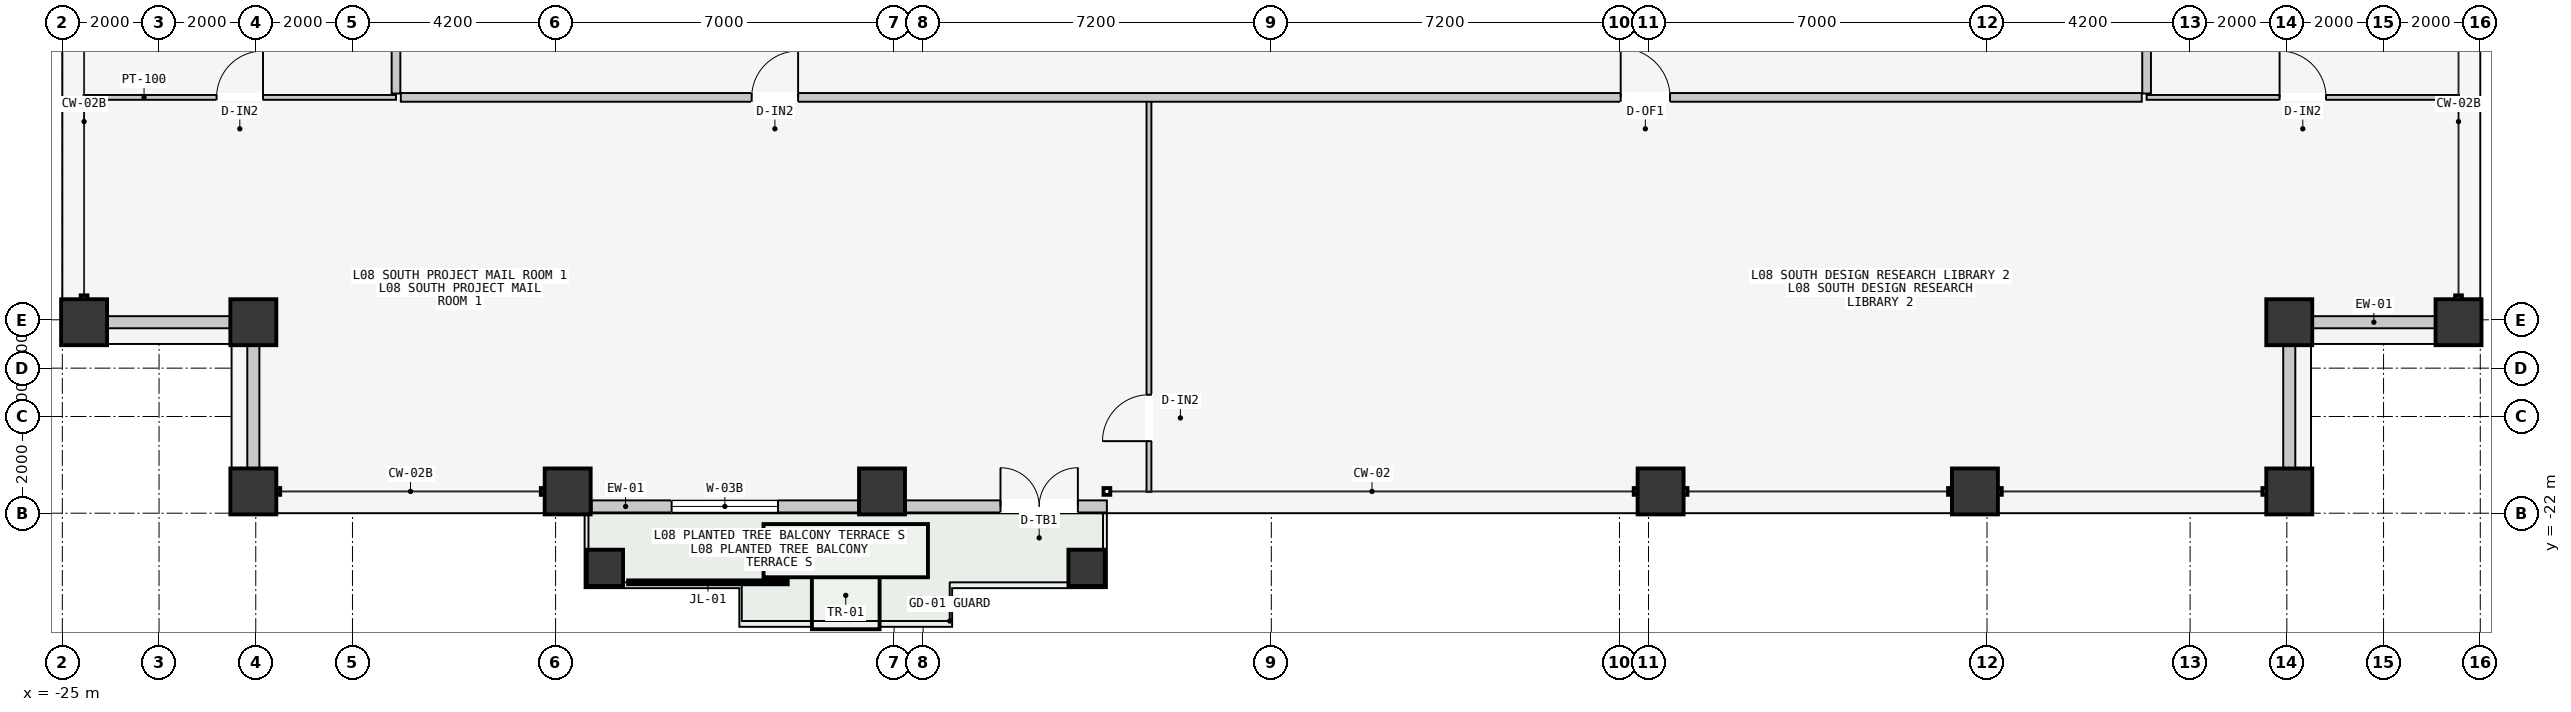
"""IFC4 building model, lengths in metres.
Left out: names, types, materials, properties, quantities, classifications, styles, units other than length and angle.
Written with IfcOpenShell. Run it as: python <this file> out.ifc"""

import sys

from ifc_helpers import new_model, si_unit, direction, frame, frame_2d, origin, origin_2d, place, context, subcontext, project, spatial, rectangle, hollow_rectangle, extrude, element, fill, save


model = new_model("IFC4")
c1 = context("Model", 3, precision=1e-05, world=origin(), true_north=direction((0.0, 1.0)))
c2 = subcontext(c1, "Body", "Model", "MODEL_VIEW")
j1 = project(units=[si_unit("LENGTHUNIT", "METRE"), si_unit("PLANEANGLEUNIT", "RADIAN")], contexts=[c1])
p1 = place(None, origin())
s1 = spatial("IfcSite", under=j1, at=p1, CompositionType="ELEMENT")
p2 = place(p1, origin())
s2 = spatial("IfcBuilding", under=s1, at=p2, CompositionType="ELEMENT")
p3 = place(p2, frame((0.0, 0.0, 34.8)))
s3 = spatial("IfcBuildingStorey", under=s2, at=p3, CompositionType="ELEMENT", Elevation=34.8)
for number, where, z_axis, x_axis in (
    (1, (-21.05, -21.55, 0.0), (0.0, 0.0, 1.0), (1.0, 0.0, 0.0)),
    (2, (-14.55, -21.55, 0.0), (0.0, 0.0, 1.0), (1.0, 0.0, 0.0)),
    (3, (-8.05, -21.55, 0.0), (0.0, 0.0, 1.0), (1.0, 0.0, 0.0)),
    (4, (8.05, -21.55, 0.0), (0.0, 0.0, 1.0), (1.0, 0.0, 0.0)),
    (5, (14.55, -21.55, 0.0), (0.0, 0.0, 1.0), (1.0, 0.0, 0.0)),
    (6, (21.05, -21.55, 0.0), (0.0, 0.0, 1.0), (1.0, 0.0, 0.0)),
    (7, (-24.55, -18.05, 0.0), (0.0, 0.0, 1.0), (0.0, 1.0, 0.0)),
    (8, (24.55, -18.05, 0.0), (0.0, 0.0, 1.0), (0.0, 1.0, 0.0)),
    (9, (21.05, -18.05, 0.0), (0.0, 0.0, 1.0), (1.0, 0.0, 0.0)),
    (10, (-21.05, -18.05, 0.0), (0.0, 0.0, 1.0), (1.0, 0.0, 0.0)),
):
    element("IfcColumn", number, at=place(p3, frame(where, z_axis=z_axis, x_axis=x_axis)), inside=s3, PredefinedType="COLUMN", context=c2, shape_type="SweptSolid", body=[
        extrude(hollow_rectangle(XDim=0.95, YDim=0.95, WallThickness=0.048, at=origin_2d()), origin(), (0.0, 0.0, 1.0), 3.6),
    ])
for number, where, z_axis, x_axis in (
    (11, (-13.78, -23.13, 0.0), (0.0, 0.0, 1.0), (1.0, 0.0, 0.0)),
    (12, (-3.82, -23.13, 0.0), (0.0, 0.0, 1.0), (1.0, 0.0, 0.0)),
):
    element("IfcColumn", number, at=place(p3, frame(where, z_axis=z_axis, x_axis=x_axis)), inside=s3, PredefinedType="COLUMN", context=c2, shape_type="SweptSolid", body=[
        extrude(hollow_rectangle(XDim=0.75, YDim=0.75, WallThickness=0.032, at=origin_2d()), origin(), (0.0, 0.0, 1.0), 3.6),
    ])
p4 = place(p3, frame((-14.055, -21.86, 0.0), z_axis=(0.0, 0.0, 1.0), x_axis=(1.0, 0.0, 0.0)))
e13 = element("IfcWall", 13, at=p4, inside=s3, PredefinedType="STANDARD", context=c2, shape_type="SweptSolid", body=[
    extrude(rectangle(XDim=5.51, YDim=0.25, at=frame_2d((2.755, 0.0))), origin(), (0.0, 0.0, 1.0), 3.4),
])
p5 = place(p4, frame((1.655, 0.0, 0.85)))
e14 = element("IfcOpeningElement", 14, at=p5, cuts=e13, PredefinedType="OPENING", context=c2, shape_type="SweptSolid", body=[
    extrude(rectangle(XDim=2.2, YDim=2.1, at=frame_2d((1.1, 1.05))), frame((0.0, 0.135, 0.0), z_axis=(0.0, -1.0, 0.0), x_axis=(1.0, 0.0, 0.0)), (0.0, 0.0, 1.0), 0.27),
])
p6 = place(p3, frame((-7.555, -21.86, 0.0), z_axis=(0.0, 0.0, 1.0), x_axis=(1.0, 0.0, 0.0)))
e15 = element("IfcWall", 15, at=p6, inside=s3, PredefinedType="STANDARD", context=c2, shape_type="SweptSolid", body=[
    extrude(rectangle(XDim=4.155, YDim=0.25, at=frame_2d((2.078, 0.0))), origin(), (0.0, 0.0, 1.0), 3.4),
])
p7 = place(p6, frame((1.955, 0.0, 0.0)))
e16 = element("IfcOpeningElement", 16, at=p7, cuts=e15, PredefinedType="OPENING", context=c2, shape_type="SweptSolid", body=[
    extrude(rectangle(XDim=1.6, YDim=2.2, at=frame_2d((0.8, 1.1))), frame((0.0, 0.135, 0.0), z_axis=(0.0, -1.0, 0.0), x_axis=(1.0, 0.0, 0.0)), (0.0, 0.0, 1.0), 0.27),
])
for number, where, z_axis, x_axis in (
    (17, (-24.065, -18.05, 0.0), (0.0, 0.0, 1.0), (1.0, 0.0, 0.0)),
    (18, (-21.05, -21.065, 0.0), (0.0, 0.0, 1.0), (0.0, 1.0, 0.0)),
    (19, (21.535, -18.05, 0.0), (0.0, 0.0, 1.0), (1.0, 0.0, 0.0)),
    (20, (21.05, -21.065, 0.0), (0.0, 0.0, 1.0), (0.0, 1.0, 0.0)),
):
    element("IfcWall", number, at=place(p3, frame(where, z_axis=z_axis, x_axis=x_axis)), inside=s3, PredefinedType="STANDARD", context=c2, shape_type="SweptSolid", body=[
        extrude(rectangle(XDim=2.53, YDim=0.25, at=frame_2d((1.265, 0.0))), origin(), (0.0, 0.0, 1.0), 2.7),
    ])
p8 = place(p3, frame((-2.53, -21.56, 0.0), z_axis=(0.0, 0.0, 1.0), x_axis=(0.0, 1.0, 0.0)))
e21 = element("IfcWall", 21, at=p8, inside=s3, PredefinedType="PARTITIONING", context=c2, shape_type="SweptSolid", body=[
    extrude(rectangle(XDim=8.1, YDim=0.1, at=frame_2d((4.05, 0.0))), origin(), (0.0, 0.0, 1.0), 3.4),
])
p9 = place(p8, frame((1.05, 0.0, 0.0)))
e22 = element("IfcOpeningElement", 22, at=p9, cuts=e21, PredefinedType="OPENING", context=c2, shape_type="SweptSolid", body=[
    extrude(rectangle(XDim=0.96, YDim=2.18, at=frame_2d((0.48, 1.09))), frame((0.0, 0.06, 0.0), z_axis=(0.0, -1.0, 0.0), x_axis=(1.0, 0.0, 0.0)), (0.0, 0.0, 1.0), 0.12),
])
p10 = place(p3, frame((-18.0, -13.4, 0.0), z_axis=(0.0, 0.0, 1.0), x_axis=(1.0, 0.0, 0.0)))
e23 = element("IfcWall", 23, at=p10, inside=s3, PredefinedType="PARTITIONING", context=c2, shape_type="SweptSolid", body=[
    extrude(rectangle(XDim=36.0, YDim=0.18, at=frame_2d((18.0, 0.0))), origin(), (0.0, 0.0, 1.0), 3.4),
])
p11 = place(p10, frame((7.255, 0.0, 0.0)))
e24 = element("IfcOpeningElement", 24, at=p11, cuts=e23, PredefinedType="OPENING", context=c2, shape_type="SweptSolid", body=[
    extrude(rectangle(XDim=0.96, YDim=2.18, at=frame_2d((0.48, 1.09))), frame((0.0, 0.1, 0.0), z_axis=(0.0, -1.0, 0.0), x_axis=(1.0, 0.0, 0.0)), (0.0, 0.0, 1.0), 0.2),
])
p12 = place(p10, frame((25.225, 0.0, 0.0)))
e25 = element("IfcOpeningElement", 25, at=p12, cuts=e23, PredefinedType="OPENING", context=c2, shape_type="SweptSolid", body=[
    extrude(rectangle(XDim=1.02, YDim=2.2, at=frame_2d((0.51, 1.1))), frame((0.0, 0.1, 0.0), z_axis=(0.0, -1.0, 0.0), x_axis=(1.0, 0.0, 0.0)), (0.0, 0.0, 1.0), 0.2),
])
p13 = place(p3, frame((-24.56, -13.4, 0.0), z_axis=(0.0, 0.0, 1.0), x_axis=(1.0, 0.0, 0.0)))
e26 = element("IfcWall", 26, at=p13, inside=s3, PredefinedType="PARTITIONING", context=c2, shape_type="SweptSolid", body=[
    extrude(rectangle(XDim=6.46, YDim=0.1, at=frame_2d((3.23, 0.0))), origin(), (0.0, 0.0, 1.0), 3.4),
])
p14 = place(p13, frame((2.75, 0.0, 0.0)))
e27 = element("IfcOpeningElement", 27, at=p14, cuts=e26, PredefinedType="OPENING", context=c2, shape_type="SweptSolid", body=[
    extrude(rectangle(XDim=0.96, YDim=2.18, at=frame_2d((0.48, 1.09))), frame((0.0, 0.06, 0.0), z_axis=(0.0, -1.0, 0.0), x_axis=(1.0, 0.0, 0.0)), (0.0, 0.0, 1.0), 0.12),
])
p15 = place(p3, frame((18.1, -13.4, 0.0), z_axis=(0.0, 0.0, 1.0), x_axis=(1.0, 0.0, 0.0)))
e28 = element("IfcWall", 28, at=p15, inside=s3, PredefinedType="PARTITIONING", context=c2, shape_type="SweptSolid", body=[
    extrude(rectangle(XDim=6.46, YDim=0.1, at=frame_2d((3.23, 0.0))), origin(), (0.0, 0.0, 1.0), 3.4),
])
p16 = place(p15, frame((2.75, 0.0, 0.0)))
e29 = element("IfcOpeningElement", 29, at=p16, cuts=e28, PredefinedType="OPENING", context=c2, shape_type="SweptSolid", body=[
    extrude(rectangle(XDim=0.96, YDim=2.18, at=frame_2d((0.48, 1.09))), frame((0.0, 0.06, 0.0), z_axis=(0.0, -1.0, 0.0), x_axis=(1.0, 0.0, 0.0)), (0.0, 0.0, 1.0), 0.12),
])
p17 = place(p3, frame((-18.1, -13.32, 0.0), z_axis=(0.0, 0.0, 1.0), x_axis=(0.0, 1.0, 0.0)))
e30 = element("IfcWall", 30, at=p17, inside=s3, PredefinedType="PARTITIONING", context=c2, shape_type="SweptSolid", body=[
    extrude(rectangle(XDim=26.64, YDim=0.18, at=frame_2d((13.32, 0.0))), origin(), (0.0, 0.0, 1.0), 3.4),
])
p18 = place(p17, frame((3.829, 0.0, 0.0)))
e31 = element("IfcOpeningElement", 31, at=p18, cuts=e30, PredefinedType="OPENING", context=c2, shape_type="SweptSolid", body=[
    extrude(rectangle(XDim=1.4, YDim=2.2, at=frame_2d((0.7, 1.1))), frame((0.0, 0.1, 0.0), z_axis=(0.0, -1.0, 0.0), x_axis=(1.0, 0.0, 0.0)), (0.0, 0.0, 1.0), 0.2),
])
p19 = place(p17, frame((17.399, 0.0, 0.0)))
e32 = element("IfcOpeningElement", 32, at=p19, cuts=e30, PredefinedType="OPENING", context=c2, shape_type="SweptSolid", body=[
    extrude(rectangle(XDim=0.9, YDim=2.15, at=frame_2d((0.45, 1.075))), frame((0.0, 0.1, 0.0), z_axis=(0.0, -1.0, 0.0), x_axis=(1.0, 0.0, 0.0)), (0.0, 0.0, 1.0), 0.2),
])
p20 = place(p3, frame((18.1, -13.32, 0.0), z_axis=(0.0, 0.0, 1.0), x_axis=(0.0, 1.0, 0.0)))
e33 = element("IfcWall", 33, at=p20, inside=s3, PredefinedType="PARTITIONING", context=c2, shape_type="SweptSolid", body=[
    extrude(rectangle(XDim=26.64, YDim=0.18, at=frame_2d((13.32, 0.0))), origin(), (0.0, 0.0, 1.0), 3.4),
])
p21 = place(p20, frame((12.62, 0.0, 0.0)))
e34 = element("IfcOpeningElement", 34, at=p21, cuts=e33, PredefinedType="OPENING", context=c2, shape_type="SweptSolid", body=[
    extrude(rectangle(XDim=1.4, YDim=2.2, at=frame_2d((0.7, 1.1))), frame((0.0, 0.1, 0.0), z_axis=(0.0, -1.0, 0.0), x_axis=(1.0, 0.0, 0.0)), (0.0, 0.0, 1.0), 0.2),
])
p22 = place(p5, origin())
e35 = element("IfcWindow", 35, at=p22, inside=s3, PartitioningType="SINGLE_PANEL", PredefinedType="WINDOW", context=c2, shape_type="SweptSolid", body=[
    extrude(rectangle(XDim=2.2, YDim=2.1, at=frame_2d((1.1, 1.05))), frame((0.0, 0.03, 0.0), z_axis=(0.0, -1.0, 0.0), x_axis=(1.0, 0.0, 0.0)), (0.0, 0.0, 1.0), 0.06),
])
fill(e14, e35)
p23 = place(p7, origin())
e36 = element("IfcDoor", 36, at=p23, inside=s3, OperationType="DOUBLE_DOOR_SINGLE_SWING", PredefinedType="DOOR", context=c2, shape_type="SweptSolid", body=[
    extrude(rectangle(XDim=1.6, YDim=2.2, at=frame_2d((0.8, 1.1))), frame((0.0, 0.025, 0.0), z_axis=(0.0, -1.0, 0.0), x_axis=(1.0, 0.0, 0.0)), (0.0, 0.0, 1.0), 0.05),
])
fill(e16, e36)
p24 = place(p9, origin())
e37 = element("IfcDoor", 37, at=p24, inside=s3, OperationType="SINGLE_SWING_LEFT", PredefinedType="DOOR", context=c2, shape_type="SweptSolid", body=[
    extrude(rectangle(XDim=0.96, YDim=2.18, at=frame_2d((0.48, 1.09))), frame((0.0, 0.025, 0.0), z_axis=(0.0, -1.0, 0.0), x_axis=(1.0, 0.0, 0.0)), (0.0, 0.0, 1.0), 0.05),
])
fill(e22, e37)
p25 = place(p11, origin())
e38 = element("IfcDoor", 38, at=p25, inside=s3, OperationType="SINGLE_SWING_RIGHT", PredefinedType="DOOR", context=c2, shape_type="SweptSolid", body=[
    extrude(rectangle(XDim=0.96, YDim=2.18, at=frame_2d((0.48, 1.09))), frame((0.0, 0.025, 0.0), z_axis=(0.0, -1.0, 0.0), x_axis=(1.0, 0.0, 0.0)), (0.0, 0.0, 1.0), 0.05),
])
fill(e24, e38)
p26 = place(p12, origin())
e39 = element("IfcDoor", 39, at=p26, inside=s3, OperationType="SINGLE_SWING_LEFT", PredefinedType="DOOR", context=c2, shape_type="SweptSolid", body=[
    extrude(rectangle(XDim=1.02, YDim=2.2, at=frame_2d((0.51, 1.1))), frame((0.0, 0.025, 0.0), z_axis=(0.0, -1.0, 0.0), x_axis=(1.0, 0.0, 0.0)), (0.0, 0.0, 1.0), 0.05),
])
fill(e25, e39)
p27 = place(p14, origin())
e40 = element("IfcDoor", 40, at=p27, inside=s3, OperationType="SINGLE_SWING_RIGHT", PredefinedType="DOOR", context=c2, shape_type="SweptSolid", body=[
    extrude(rectangle(XDim=0.96, YDim=2.18, at=frame_2d((0.48, 1.09))), frame((0.0, 0.025, 0.0), z_axis=(0.0, -1.0, 0.0), x_axis=(1.0, 0.0, 0.0)), (0.0, 0.0, 1.0), 0.05),
])
fill(e27, e40)
p28 = place(p16, origin())
e41 = element("IfcDoor", 41, at=p28, inside=s3, OperationType="SINGLE_SWING_LEFT", PredefinedType="DOOR", context=c2, shape_type="SweptSolid", body=[
    extrude(rectangle(XDim=0.96, YDim=2.18, at=frame_2d((0.48, 1.09))), frame((0.0, 0.025, 0.0), z_axis=(0.0, -1.0, 0.0), x_axis=(1.0, 0.0, 0.0)), (0.0, 0.0, 1.0), 0.05),
])
fill(e29, e41)
save(model, sys.argv[1])
